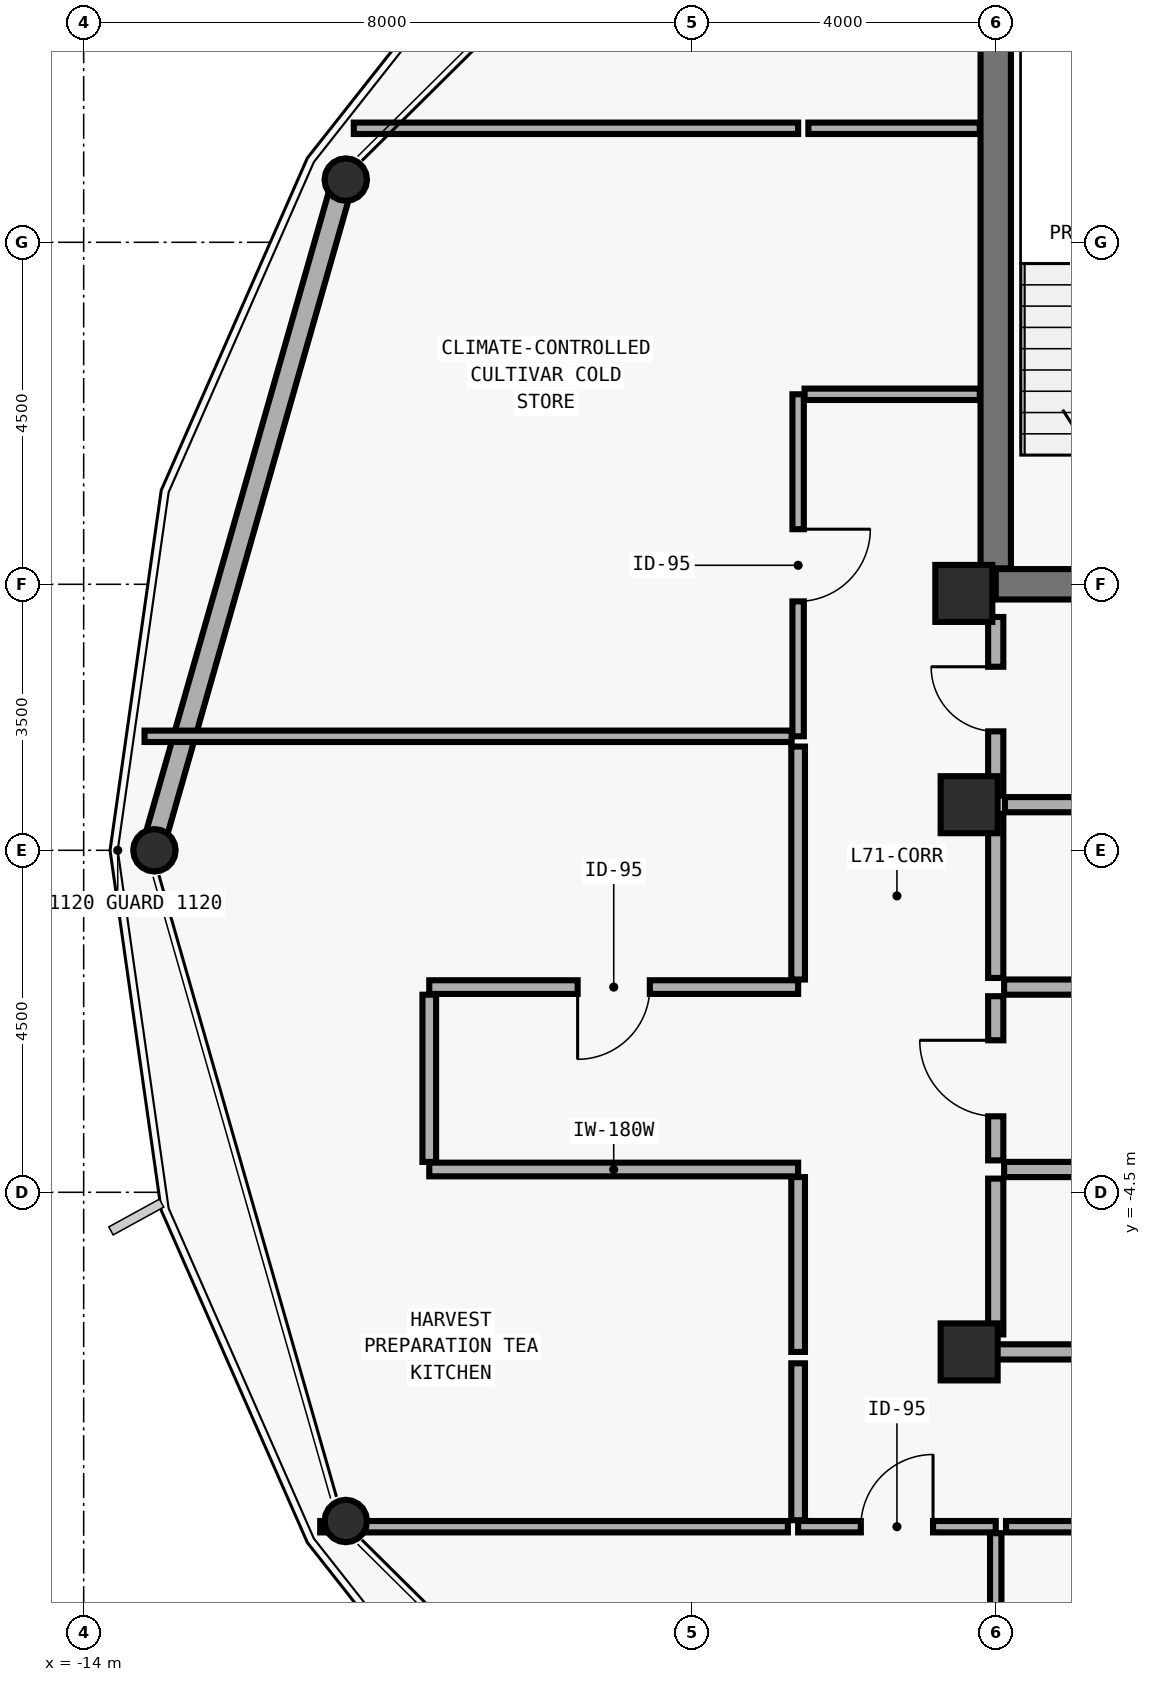
"""IFC4 building model, lengths in metres.
Left out: names, types, materials, properties, quantities, classifications, styles, units other than length and angle.
Written with IfcOpenShell. Run it as: python <this file> out.ifc"""

import sys

from ifc_helpers import new_model, si_unit, direction, frame, frame_2d, origin, origin_2d, place, context, subcontext, project, spatial, rectangle, hollow_circle, extrude, element, fill, save


model = new_model("IFC4")
c1 = context("Model", 3, precision=1e-05, world=origin(), true_north=direction((0.0, 1.0)))
c2 = subcontext(c1, "Body", "Model", "MODEL_VIEW")
j1 = project(units=[si_unit("LENGTHUNIT", "METRE"), si_unit("PLANEANGLEUNIT", "RADIAN")], contexts=[c1])
p1 = place(None, origin())
s1 = spatial("IfcSite", under=j1, at=p1, CompositionType="ELEMENT")
p2 = place(p1, origin())
s2 = spatial("IfcBuilding", under=s1, at=p2, CompositionType="ELEMENT")
p3 = place(p2, frame((0.0, 0.0, 277.8)))
s3 = spatial("IfcBuildingStorey", under=s2, at=p3, CompositionType="ELEMENT", Elevation=277.8)
p4 = place(p3, frame((-2.0, 3.5, 0.0), z_axis=(0.0, 0.0, 1.0), x_axis=(1.0, 0.0, 0.0)))
e1 = element("IfcWall", 1, at=p4, inside=s3, PredefinedType="SHEAR", context=c2, shape_type="SweptSolid", body=[
    extrude(rectangle(XDim=10.0, YDim=0.4, at=frame_2d((5.0, 0.0))), origin(), (0.0, 0.0, 1.0), 3.592),
])
p5 = place(p4, frame((1.65, 0.0, 0.0)))
e2 = element("IfcOpeningElement", 2, at=p5, cuts=e1, PredefinedType="OPENING", context=c2, shape_type="SweptSolid", body=[
    extrude(rectangle(XDim=1.1, YDim=2.15, at=frame_2d((0.55, 1.075))), frame((0.0, 0.21, 0.0), z_axis=(0.0, -1.0, 0.0), x_axis=(1.0, 0.0, 0.0)), (0.0, 0.0, 1.0), 0.42),
])
p6 = place(p4, frame((7.65, 0.0, 0.0)))
e3 = element("IfcOpeningElement", 3, at=p6, cuts=e1, PredefinedType="OPENING", context=c2, shape_type="SweptSolid", body=[
    extrude(rectangle(XDim=1.1, YDim=2.15, at=frame_2d((0.55, 1.075))), frame((0.0, 0.21, 0.0), z_axis=(0.0, -1.0, 0.0), x_axis=(1.0, 0.0, 0.0)), (0.0, 0.0, 1.0), 0.42),
])
p7 = place(p4, frame((3.72, 0.0, 0.0)))
e4 = element("IfcOpeningElement", 4, at=p7, cuts=e1, PredefinedType="OPENING", context=c2, shape_type="SweptSolid", body=[
    extrude(rectangle(XDim=1.1, YDim=2.2, at=frame_2d((0.55, 1.1))), frame((0.0, 0.21, 0.0), z_axis=(0.0, -1.0, 0.0), x_axis=(1.0, 0.0, 0.0)), (0.0, 0.0, 1.0), 0.42),
])
p8 = place(p4, frame((5.18, 0.0, 0.0)))
e5 = element("IfcOpeningElement", 5, at=p8, cuts=e1, PredefinedType="OPENING", context=c2, shape_type="SweptSolid", body=[
    extrude(rectangle(XDim=1.1, YDim=2.2, at=frame_2d((0.55, 1.1))), frame((0.0, 0.21, 0.0), z_axis=(0.0, -1.0, 0.0), x_axis=(1.0, 0.0, 0.0)), (0.0, 0.0, 1.0), 0.42),
])
p9 = place(p3, frame((-2.0, 3.71, 0.0), z_axis=(0.0, 0.0, 1.0), x_axis=(0.0, 1.0, 0.0)))
e6 = element("IfcWall", 6, at=p9, inside=s3, PredefinedType="SHEAR", context=c2, shape_type="SweptSolid", body=[
    extrude(rectangle(XDim=8.58, YDim=0.4, at=frame_2d((4.29, 0.0))), origin(), (0.0, 0.0, 1.0), 3.592),
])
for number, where, z_axis, x_axis in (
    (7, (-2.42, 3.38, 0.0), (0.0, 0.0, 1.0), (1.0, 0.0, 0.0)),
    (8, (-2.35, 0.6, 0.0), (0.0, 0.0, 1.0), (1.0, 0.0, 0.0)),
    (9, (-2.35, -6.6, 0.0), (0.0, 0.0, 1.0), (1.0, 0.0, 0.0)),
):
    element("IfcColumn", number, at=place(p3, frame(where, z_axis=z_axis, x_axis=x_axis)), inside=s3, PredefinedType="COLUMN", context=c2, shape_type="SweptSolid", body=[
        extrude(rectangle(XDim=0.75, YDim=0.75, at=origin_2d()), origin(), (0.0, 0.0, 1.0), 3.575),
    ])
p10 = place(p3, frame((-10.581, 8.833, 0.0), z_axis=(0.016455959383, -0.00477973924, 0.999853166967), x_axis=(0.278928739366, 0.960311802674, 0.0)))
e10 = element("IfcColumn", 10, at=p10, inside=s3, PredefinedType="COLUMN", context=c2, shape_type="SweptSolid", body=[
    extrude(hollow_circle(Radius=0.28, WallThickness=0.02, at=origin_2d()), origin(), (0.0, 0.0, 1.0), 3.575),
])
p11 = place(p3, frame((-13.103, 0.0, 0.0), z_axis=(0.019050015053, 0.0, 0.999818531998), x_axis=(0.0, 1.0, 0.0)))
e11 = element("IfcColumn", 11, at=p11, inside=s3, PredefinedType="COLUMN", context=c2, shape_type="SweptSolid", body=[
    extrude(hollow_circle(Radius=0.28, WallThickness=0.02, at=origin_2d()), origin(), (0.0, 0.0, 1.0), 3.576),
])
p12 = place(p3, frame((-10.581, -8.833, 0.0), z_axis=(0.016455959383, 0.00477973924, 0.999853166967), x_axis=(-0.278928739366, 0.960311802674, 0.0)))
e12 = element("IfcColumn", 12, at=p12, inside=s3, PredefinedType="COLUMN", context=c2, shape_type="SweptSolid", body=[
    extrude(hollow_circle(Radius=0.28, WallThickness=0.02, at=origin_2d()), origin(), (0.0, 0.0, 1.0), 3.575),
])
p13 = place(p3, frame((-13.039, 0.226, 0.0), z_axis=(0.0, 0.0, 1.0), x_axis=(0.27454727202, 0.961573603749, 0.0)))
e13 = element("IfcWall", 13, at=p13, inside=s3, PredefinedType="SOLIDWALL", context=c2, shape_type="SweptSolid", body=[
    extrude(rectangle(XDim=8.717, YDim=0.28, at=frame_2d((4.359, 0.0))), origin(), (0.0, 0.0, 1.0), 2.97),
])
p14 = place(p3, frame((-2.0, 0.72, 0.0), z_axis=(0.0, 0.0, 1.0), x_axis=(0.0, 1.0, 0.0)))
e14 = element("IfcWall", 14, at=p14, inside=s3, PredefinedType="MOVABLE", context=c2, shape_type="SweptSolid", body=[
    extrude(rectangle(XDim=2.35, YDim=0.2, at=frame_2d((1.175, 0.0))), origin(), (0.0, 0.0, 1.0), 2.692),
])
p15 = place(p14, frame((0.845, 0.0, 0.0)))
e15 = element("IfcOpeningElement", 15, at=p15, cuts=e14, PredefinedType="OPENING", context=c2, shape_type="SweptSolid", body=[
    extrude(rectangle(XDim=0.85, YDim=2.1, at=frame_2d((0.425, 1.05))), frame((0.0, 0.11, 0.0), z_axis=(0.0, -1.0, 0.0), x_axis=(1.0, 0.0, 0.0)), (0.0, 0.0, 1.0), 0.22),
])
p16 = place(p3, frame((-2.0, -4.08, 0.0), z_axis=(0.0, 0.0, 1.0), x_axis=(0.0, 1.0, 0.0)))
e16 = element("IfcWall", 16, at=p16, inside=s3, PredefinedType="MOVABLE", context=c2, shape_type="SweptSolid", body=[
    extrude(rectangle(XDim=2.16, YDim=0.2, at=frame_2d((1.08, 0.0))), origin(), (0.0, 0.0, 1.0), 3.072),
])
p17 = place(p16, frame((0.58, 0.0, 0.0)))
e17 = element("IfcOpeningElement", 17, at=p17, cuts=e16, PredefinedType="OPENING", context=c2, shape_type="SweptSolid", body=[
    extrude(rectangle(XDim=1.0, YDim=2.1, at=frame_2d((0.5, 1.05))), frame((0.0, 0.11, 0.0), z_axis=(0.0, -1.0, 0.0), x_axis=(1.0, 0.0, 0.0)), (0.0, 0.0, 1.0), 0.22),
])
p18 = place(p3, frame((-1.89, -1.8, 0.0), z_axis=(0.0, 0.0, 1.0), x_axis=(1.0, 0.0, 0.0)))
e18 = element("IfcWall", 18, at=p18, inside=s3, PredefinedType="MOVABLE", context=c2, shape_type="SweptSolid", body=[
    extrude(rectangle(XDim=5.73, YDim=0.2, at=frame_2d((2.865, 0.0))), origin(), (0.0, 0.0, 1.0), 3.36),
])
p19 = place(p18, frame((2.29, 0.0, 0.0)))
e19 = element("IfcOpeningElement", 19, at=p19, cuts=e18, PredefinedType="OPENING", context=c2, shape_type="SweptSolid", body=[
    extrude(rectangle(XDim=1.0, YDim=2.1, at=frame_2d((0.5, 1.05))), frame((0.0, 0.11, 0.0), z_axis=(0.0, -1.0, 0.0), x_axis=(1.0, 0.0, 0.0)), (0.0, 0.0, 1.0), 0.22),
])
p20 = place(p3, frame((-1.89, -4.2, 0.0), z_axis=(0.0, 0.0, 1.0), x_axis=(1.0, 0.0, 0.0)))
e20 = element("IfcWall", 20, at=p20, inside=s3, PredefinedType="MOVABLE", context=c2, shape_type="SweptSolid", body=[
    extrude(rectangle(XDim=5.73, YDim=0.2, at=frame_2d((2.865, 0.0))), origin(), (0.0, 0.0, 1.0), 3.36),
])
p21 = place(p20, frame((2.29, 0.0, 0.0)))
e21 = element("IfcOpeningElement", 21, at=p21, cuts=e20, PredefinedType="OPENING", context=c2, shape_type="SweptSolid", body=[
    extrude(rectangle(XDim=1.0, YDim=2.1, at=frame_2d((0.5, 1.05))), frame((0.0, 0.11, 0.0), z_axis=(0.0, -1.0, 0.0), x_axis=(1.0, 0.0, 0.0)), (0.0, 0.0, 1.0), 0.22),
])
p22 = place(p3, frame((-4.6, -8.9, 0.0), z_axis=(0.0, 0.0, 1.0), x_axis=(1.0, 0.0, 0.0)))
e22 = element("IfcWall", 22, at=p22, inside=s3, PredefinedType="PARTITIONING", context=c2, shape_type="SweptSolid", body=[
    extrude(rectangle(XDim=2.6, YDim=0.15, at=frame_2d((1.3, 0.0))), origin(), (0.0, 0.0, 1.0), 3.36),
])
p23 = place(p22, frame((0.825, 0.0, 0.0)))
e23 = element("IfcOpeningElement", 23, at=p23, cuts=e22, PredefinedType="OPENING", context=c2, shape_type="SweptSolid", body=[
    extrude(rectangle(XDim=0.95, YDim=2.1, at=frame_2d((0.475, 1.05))), frame((0.0, 0.085, 0.0), z_axis=(0.0, -1.0, 0.0), x_axis=(1.0, 0.0, 0.0)), (0.0, 0.0, 1.0), 0.17),
])
p24 = place(p3, frame((-1.865, -8.9, 0.0), z_axis=(0.0, 0.0, 1.0), x_axis=(1.0, 0.0, 0.0)))
e24 = element("IfcWall", 24, at=p24, inside=s3, PredefinedType="PARTITIONING", context=c2, shape_type="SweptSolid", body=[
    extrude(rectangle(XDim=6.865, YDim=0.15, at=frame_2d((3.433, 0.0))), origin(), (0.0, 0.0, 1.0), 3.36),
])
p25 = place(p24, frame((2.89, 0.0, 0.0)))
e25 = element("IfcOpeningElement", 25, at=p25, cuts=e24, PredefinedType="OPENING", context=c2, shape_type="SweptSolid", body=[
    extrude(rectangle(XDim=0.95, YDim=2.1, at=frame_2d((0.475, 1.05))), frame((0.0, 0.085, 0.0), z_axis=(0.0, -1.0, 0.0), x_axis=(1.0, 0.0, 0.0)), (0.0, 0.0, 1.0), 0.17),
])
p26 = place(p3, frame((-4.6, -1.8, 0.0), z_axis=(0.0, 0.0, 1.0), x_axis=(-1.0, 0.0, 0.0)))
e26 = element("IfcWall", 26, at=p26, inside=s3, PredefinedType="PLUMBINGWALL", context=c2, shape_type="SweptSolid", body=[
    extrude(rectangle(XDim=4.853, YDim=0.18, at=frame_2d((2.426, 0.0))), origin(), (0.0, 0.0, 1.0), 3.36),
])
p27 = place(p26, frame((1.951, 0.0, 0.0)))
e27 = element("IfcOpeningElement", 27, at=p27, cuts=e26, PredefinedType="OPENING", context=c2, shape_type="SweptSolid", body=[
    extrude(rectangle(XDim=0.95, YDim=2.1, at=frame_2d((0.475, 1.05))), frame((0.0, 0.1, 0.0), z_axis=(0.0, -1.0, 0.0), x_axis=(1.0, 0.0, 0.0)), (0.0, 0.0, 1.0), 0.2),
])
p28 = place(p3, frame((-4.6, 6.0, 0.0), z_axis=(0.0, 0.0, 1.0), x_axis=(0.0, -1.0, 0.0)))
e28 = element("IfcWall", 28, at=p28, inside=s3, PredefinedType="PARTITIONING", context=c2, shape_type="SweptSolid", body=[
    extrude(rectangle(XDim=4.5, YDim=0.15, at=frame_2d((2.25, 0.0))), origin(), (0.0, 0.0, 1.0), 3.36),
])
p29 = place(p28, frame((1.775, 0.0, 0.0)))
e29 = element("IfcOpeningElement", 29, at=p29, cuts=e28, PredefinedType="OPENING", context=c2, shape_type="SweptSolid", body=[
    extrude(rectangle(XDim=0.95, YDim=2.1, at=frame_2d((0.475, 1.05))), frame((0.0, 0.085, 0.0), z_axis=(0.0, -1.0, 0.0), x_axis=(1.0, 0.0, 0.0)), (0.0, 0.0, 1.0), 0.17),
])
p30 = place(p3, frame((-1.88, 0.6, 0.0), z_axis=(0.0, 0.0, 1.0), x_axis=(1.0, 0.0, 0.0)))
e30 = element("IfcWall", 30, at=p30, inside=s3, PredefinedType="MOVABLE", context=c2, shape_type="SweptSolid", body=[
    extrude(rectangle(XDim=5.72, YDim=0.2, at=frame_2d((2.86, 0.0))), origin(), (0.0, 0.0, 1.0), 3.072),
])
p31 = place(p3, frame((-2.0, -1.68, 0.0), z_axis=(0.0, 0.0, 1.0), x_axis=(0.0, 1.0, 0.0)))
e31 = element("IfcWall", 31, at=p31, inside=s3, PredefinedType="MOVABLE", context=c2, shape_type="SweptSolid", body=[
    extrude(rectangle(XDim=2.16, YDim=0.2, at=frame_2d((1.08, 0.0))), origin(), (0.0, 0.0, 1.0), 3.072),
])
p32 = place(p3, frame((-2.0, -6.6, 0.0), z_axis=(0.0, 0.0, 1.0), x_axis=(1.0, 0.0, 0.0)))
e32 = element("IfcWall", 32, at=p32, inside=s3, PredefinedType="MOVABLE", context=c2, shape_type="SweptSolid", body=[
    extrude(rectangle(XDim=5.84, YDim=0.2, at=frame_2d((2.92, 0.0))), origin(), (0.0, 0.0, 1.0), 3.072),
])
p33 = place(p3, frame((-2.0, -6.37, 0.0), z_axis=(0.0, 0.0, 1.0), x_axis=(0.0, 1.0, 0.0)))
e33 = element("IfcWall", 33, at=p33, inside=s3, PredefinedType="MOVABLE", context=c2, shape_type="SweptSolid", body=[
    extrude(rectangle(XDim=2.05, YDim=0.2, at=frame_2d((1.025, 0.0))), origin(), (0.0, 0.0, 1.0), 3.072),
])
p34 = place(p3, frame((-2.0, -8.985, 0.0), z_axis=(0.0, 0.0, 1.0), x_axis=(0.0, -1.0, 0.0)))
e34 = element("IfcWall", 34, at=p34, inside=s3, PredefinedType="PARTITIONING", context=c2, shape_type="SweptSolid", body=[
    extrude(rectangle(XDim=7.542, YDim=0.15, at=frame_2d((3.771, 0.0))), origin(), (0.0, 0.0, 1.0), 2.892),
])
p35 = place(p3, frame((-10.888, -8.9, 0.0), z_axis=(0.0, 0.0, 1.0), x_axis=(1.0, 0.0, 0.0)))
e35 = element("IfcWall", 35, at=p35, inside=s3, PredefinedType="PARTITIONING", context=c2, shape_type="SweptSolid", body=[
    extrude(rectangle(XDim=6.153, YDim=0.15, at=frame_2d((3.076, 0.0))), origin(), (0.0, 0.0, 1.0), 2.892),
])
p36 = place(p3, frame((-9.453, -4.2, 0.0), z_axis=(0.0, 0.0, 1.0), x_axis=(1.0, 0.0, 0.0)))
e36 = element("IfcWall", 36, at=p36, inside=s3, PredefinedType="PLUMBINGWALL", context=c2, shape_type="SweptSolid", body=[
    extrude(rectangle(XDim=4.853, YDim=0.18, at=frame_2d((2.426, 0.0))), origin(), (0.0, 0.0, 1.0), 3.36),
])
p37 = place(p3, frame((-4.6, 1.365, 0.0), z_axis=(0.0, 0.0, 1.0), x_axis=(0.0, -1.0, 0.0)))
e37 = element("IfcWall", 37, at=p37, inside=s3, PredefinedType="PLUMBINGWALL", context=c2, shape_type="SweptSolid", body=[
    extrude(rectangle(XDim=3.065, YDim=0.18, at=frame_2d((1.532, 0.0))), origin(), (0.0, 0.0, 1.0), 3.36),
])
p38 = place(p3, frame((-9.453, -1.9, 0.0), z_axis=(0.0, 0.0, 1.0), x_axis=(0.0, -1.0, 0.0)))
e38 = element("IfcWall", 38, at=p38, inside=s3, PredefinedType="PLUMBINGWALL", context=c2, shape_type="SweptSolid", body=[
    extrude(rectangle(XDim=2.2, YDim=0.18, at=frame_2d((1.1, 0.0))), origin(), (0.0, 0.0, 1.0), 3.36),
])
p39 = place(p3, frame((-4.6, -4.3, 0.0), z_axis=(0.0, 0.0, 1.0), x_axis=(0.0, -1.0, 0.0)))
e39 = element("IfcWall", 39, at=p39, inside=s3, PredefinedType="PLUMBINGWALL", context=c2, shape_type="SweptSolid", body=[
    extrude(rectangle(XDim=2.3, YDim=0.18, at=frame_2d((1.15, 0.0))), origin(), (0.0, 0.0, 1.0), 3.36),
])
p40 = place(p3, frame((-4.6, -6.75, 0.0), z_axis=(0.0, 0.0, 1.0), x_axis=(0.0, -1.0, 0.0)))
e40 = element("IfcWall", 40, at=p40, inside=s3, PredefinedType="PLUMBINGWALL", context=c2, shape_type="SweptSolid", body=[
    extrude(rectangle(XDim=2.065, YDim=0.18, at=frame_2d((1.032, 0.0))), origin(), (0.0, 0.0, 1.0), 3.36),
])
p41 = place(p3, frame((-13.199, 1.5, 0.0), z_axis=(0.0, 0.0, 1.0), x_axis=(1.0, 0.0, 0.0)))
e41 = element("IfcWall", 41, at=p41, inside=s3, PredefinedType="PARTITIONING", context=c2, shape_type="SweptSolid", body=[
    extrude(rectangle(XDim=8.514, YDim=0.15, at=frame_2d((4.257, 0.0))), origin(), (0.0, 0.0, 1.0), 3.36),
])
p42 = place(p3, frame((-2.21, 6.0, 0.0), z_axis=(0.0, 0.0, 1.0), x_axis=(-1.0, 0.0, 0.0)))
e42 = element("IfcWall", 42, at=p42, inside=s3, PredefinedType="PARTITIONING", context=c2, shape_type="SweptSolid", body=[
    extrude(rectangle(XDim=2.305, YDim=0.15, at=frame_2d((1.152, 0.0))), origin(), (0.0, 0.0, 1.0), 3.36),
])
p43 = place(p3, frame((-10.446, 9.5, 0.0), z_axis=(0.0, 0.0, 1.0), x_axis=(1.0, 0.0, 0.0)))
e43 = element("IfcWall", 43, at=p43, inside=s3, PredefinedType="PARTITIONING", context=c2, shape_type="SweptSolid", body=[
    extrude(rectangle(XDim=5.846, YDim=0.15, at=frame_2d((2.923, 0.0))), origin(), (0.0, 0.0, 1.0), 3.36),
])
p44 = place(p3, frame((-4.465, 9.5, 0.0), z_axis=(0.0, 0.0, 1.0), x_axis=(1.0, 0.0, 0.0)))
e44 = element("IfcWall", 44, at=p44, inside=s3, PredefinedType="PARTITIONING", context=c2, shape_type="SweptSolid", body=[
    extrude(rectangle(XDim=2.255, YDim=0.15, at=frame_2d((1.127, 0.0))), origin(), (0.0, 0.0, 1.0), 3.36),
])
p45 = place(p15, origin())
e45 = element("IfcDoor", 45, at=p45, inside=s3, OperationType="SINGLE_SWING_RIGHT", PredefinedType="DOOR", context=c2, shape_type="SweptSolid", body=[
    extrude(rectangle(XDim=0.85, YDim=2.1, at=frame_2d((0.425, 1.05))), frame((0.0, 0.025, 0.0), z_axis=(0.0, -1.0, 0.0), x_axis=(1.0, 0.0, 0.0)), (0.0, 0.0, 1.0), 0.05),
])
fill(e15, e45)
p46 = place(p17, origin())
e46 = element("IfcDoor", 46, at=p46, inside=s3, OperationType="SINGLE_SWING_RIGHT", PredefinedType="DOOR", context=c2, shape_type="SweptSolid", body=[
    extrude(rectangle(XDim=1.0, YDim=2.1, at=frame_2d((0.5, 1.05))), frame((0.0, 0.025, 0.0), z_axis=(0.0, -1.0, 0.0), x_axis=(1.0, 0.0, 0.0)), (0.0, 0.0, 1.0), 0.05),
])
fill(e17, e46)
p47 = place(p23, origin())
e47 = element("IfcDoor", 47, at=p47, inside=s3, OperationType="SINGLE_SWING_RIGHT", PredefinedType="DOOR", context=c2, shape_type="SweptSolid", body=[
    extrude(rectangle(XDim=0.95, YDim=2.1, at=frame_2d((0.475, 1.05))), frame((0.0, 0.025, 0.0), z_axis=(0.0, -1.0, 0.0), x_axis=(1.0, 0.0, 0.0)), (0.0, 0.0, 1.0), 0.05),
])
fill(e23, e47)
p48 = place(p27, origin())
e48 = element("IfcDoor", 48, at=p48, inside=s3, OperationType="SINGLE_SWING_RIGHT", PredefinedType="DOOR", context=c2, shape_type="SweptSolid", body=[
    extrude(rectangle(XDim=0.95, YDim=2.1, at=frame_2d((0.475, 1.05))), frame((0.0, 0.025, 0.0), z_axis=(0.0, -1.0, 0.0), x_axis=(1.0, 0.0, 0.0)), (0.0, 0.0, 1.0), 0.05),
])
fill(e27, e48)
p49 = place(p29, origin())
e49 = element("IfcDoor", 49, at=p49, inside=s3, OperationType="SINGLE_SWING_LEFT", PredefinedType="DOOR", context=c2, shape_type="SweptSolid", body=[
    extrude(rectangle(XDim=0.95, YDim=2.1, at=frame_2d((0.475, 1.05))), frame((0.0, 0.025, 0.0), z_axis=(0.0, -1.0, 0.0), x_axis=(1.0, 0.0, 0.0)), (0.0, 0.0, 1.0), 0.05),
])
fill(e29, e49)
save(model, sys.argv[1])
